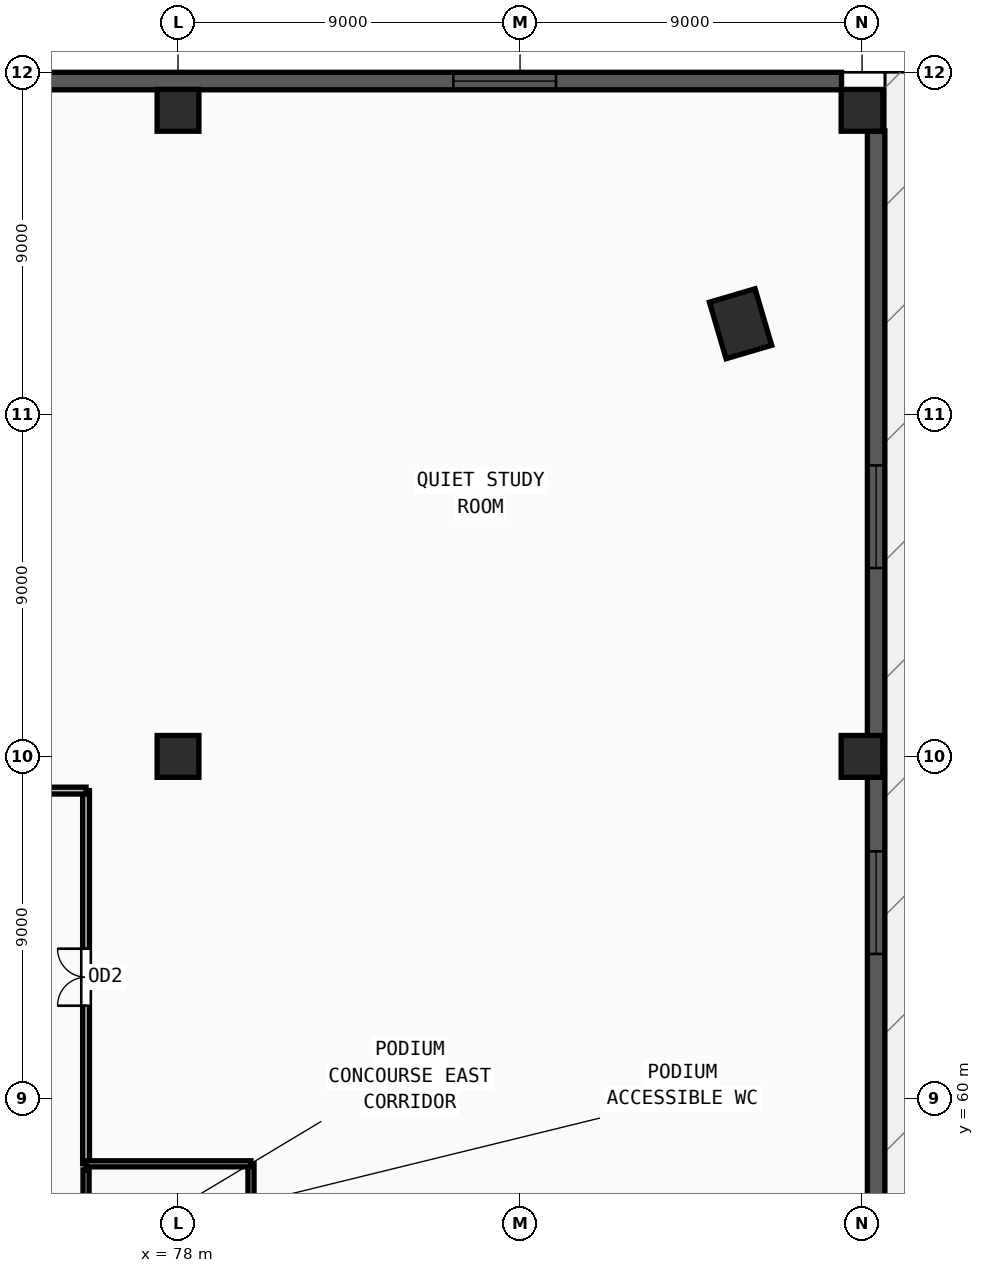
"""IFC4 building model, lengths in metres.
Left out: names, types, materials, properties, quantities, classifications, styles, units other than length and angle.
Written with IfcOpenShell. Run it as: python <this file> out.ifc"""

import sys

from ifc_helpers import new_model, si_unit, direction, frame, frame_2d, origin, origin_2d, place, context, subcontext, project, spatial, rectangle, extrude, source, transform, mapped, element, fill, save


model = new_model("IFC4")
c1 = context("Model", 3, precision=1e-05, world=origin(), true_north=direction((0.0, 1.0)))
c2 = subcontext(c1, "Body", "Model", "MODEL_VIEW")
j1 = project(units=[si_unit("LENGTHUNIT", "METRE"), si_unit("PLANEANGLEUNIT", "RADIAN")], contexts=[c1])
p1 = place(None, origin())
s1 = spatial("IfcSite", under=j1, at=p1, CompositionType="ELEMENT")
p2 = place(p1, origin())
s2 = spatial("IfcBuilding", under=s1, at=p2, CompositionType="ELEMENT")
p3 = place(p2, frame((0.0, 0.0, 18.9)))
s3 = spatial("IfcBuildingStorey", under=s2, at=p3, CompositionType="ELEMENT", Elevation=18.9)
m1 = source(origin(), c2, "Body", "SweptSolid", [
    extrude(rectangle(XDim=1.55, YDim=1.25, at=origin_2d()), origin(), (0.0, 0.0, 1.0), 4.5),
])
p4 = place(p3, frame((92.803, 80.384, 0.0), z_axis=(0.0, 0.0, 1.0), x_axis=(-0.282676303383, 0.959215360337, 0.0)))
e1 = element("IfcColumn", 1, at=p4, inside=s3, PredefinedType="COLUMN", context=c2, shape_type="MappedRepresentation", body=[
    mapped(m1, transform((0.0, 0.0, 0.0), x_axis=(1.0, 0.0, 0.0), y_axis=(0.0, 1.0, 0.0), z_axis=(0.0, 0.0, 1.0), scale=1.0)),
])
m2 = source(origin(), c2, "Body", "SweptSolid", [
    extrude(rectangle(XDim=1.1, YDim=1.1, at=origin_2d()), origin(), (0.0, 0.0, 1.0), 4.5),
])
for number, where, z_axis, x_axis in (
    (2, (78.0, 69.0, 0.0), (0.0, 0.0, 1.0), (1.0, 0.0, 0.0)),
    (3, (96.0, 69.0, 0.0), (0.0, 0.0, 1.0), (1.0, 0.0, 0.0)),
    (4, (78.0, 86.0, 0.0), (0.0, 0.0, 1.0), (1.0, 0.0, 0.0)),
    (5, (96.0, 86.0, 0.0), (0.0, 0.0, 1.0), (1.0, 0.0, 0.0)),
):
    element("IfcColumn", number, at=place(p3, frame(where, z_axis=z_axis, x_axis=x_axis)), inside=s3, PredefinedType="COLUMN", context=c2, shape_type="MappedRepresentation", body=[
        mapped(m2, transform((0.0, 0.0, 0.0), x_axis=(1.0, 0.0, 0.0), y_axis=(0.0, 1.0, 0.0), z_axis=(0.0, 0.0, 1.0), scale=1.0)),
    ])
p5 = place(p3, frame((96.37, 24.54, 0.0), z_axis=(0.0, 0.0, 1.0), x_axis=(0.0, 1.0, 0.0)))
e6 = element("IfcWall", 6, at=p5, inside=s3, PredefinedType="SOLIDWALL", context=c2, shape_type="SweptSolid", body=[
    extrude(rectangle(XDim=60.92, YDim=0.46, at=frame_2d((30.46, 0.0))), origin(), (0.0, 0.0, 1.0), 3.6),
])
m3 = source(origin(), c2, "Body", "SweptSolid", [
    extrude(rectangle(XDim=2.7, YDim=2.35, at=frame_2d((1.35, 1.175))), frame((0.0, 0.24, 0.0), z_axis=(0.0, -1.0, 0.0), x_axis=(1.0, 0.0, 0.0)), (0.0, 0.0, 1.0), 0.48),
])
p6 = place(p5, frame((8.803, 0.0, 0.55)))
e7 = element("IfcOpeningElement", 7, at=p6, cuts=e6, PredefinedType="OPENING", context=c2, shape_type="MappedRepresentation", body=[
    mapped(m3, transform((0.0, 0.0, 0.0), x_axis=(1.0, 0.0, 0.0), y_axis=(0.0, 1.0, 0.0), z_axis=(0.0, 0.0, 1.0), scale=1.0)),
])
p7 = place(p5, frame((29.11, 0.0, 0.55)))
e8 = element("IfcOpeningElement", 8, at=p7, cuts=e6, PredefinedType="OPENING", context=c2, shape_type="MappedRepresentation", body=[
    mapped(m3, transform((0.0, 0.0, 0.0), x_axis=(1.0, 0.0, 0.0), y_axis=(0.0, 1.0, 0.0), z_axis=(0.0, 0.0, 1.0), scale=1.0)),
])
p8 = place(p5, frame((39.263, 0.0, 0.55)))
e9 = element("IfcOpeningElement", 9, at=p8, cuts=e6, PredefinedType="OPENING", context=c2, shape_type="MappedRepresentation", body=[
    mapped(m3, transform((0.0, 0.0, 0.0), x_axis=(1.0, 0.0, 0.0), y_axis=(0.0, 1.0, 0.0), z_axis=(0.0, 0.0, 1.0), scale=1.0)),
])
p9 = place(p5, frame((49.417, 0.0, 0.55)))
e10 = element("IfcOpeningElement", 10, at=p9, cuts=e6, PredefinedType="OPENING", context=c2, shape_type="MappedRepresentation", body=[
    mapped(m3, transform((0.0, 0.0, 0.0), x_axis=(1.0, 0.0, 0.0), y_axis=(0.0, 1.0, 0.0), z_axis=(0.0, 0.0, 1.0), scale=1.0)),
])
p10 = place(p3, frame((95.46, 86.77, 0.0), z_axis=(0.0, 0.0, 1.0), x_axis=(-1.0, 0.0, 0.0)))
e11 = element("IfcWall", 11, at=p10, inside=s3, PredefinedType="SOLIDWALL", context=c2, shape_type="SweptSolid", body=[
    extrude(rectangle(XDim=70.92, YDim=0.46, at=frame_2d((35.46, 0.0))), origin(), (0.0, 0.0, 1.0), 3.6),
])
p11 = place(p10, frame((7.515, 0.0, 0.55)))
e12 = element("IfcOpeningElement", 12, at=p11, cuts=e11, PredefinedType="OPENING", context=c2, shape_type="MappedRepresentation", body=[
    mapped(m3, transform((0.0, 0.0, 0.0), x_axis=(1.0, 0.0, 0.0), y_axis=(0.0, 1.0, 0.0), z_axis=(0.0, 0.0, 1.0), scale=1.0)),
])
p12 = place(p10, frame((25.245, 0.0, 0.55)))
e13 = element("IfcOpeningElement", 13, at=p12, cuts=e11, PredefinedType="OPENING", context=c2, shape_type="MappedRepresentation", body=[
    mapped(m3, transform((0.0, 0.0, 0.0), x_axis=(1.0, 0.0, 0.0), y_axis=(0.0, 1.0, 0.0), z_axis=(0.0, 0.0, 1.0), scale=1.0)),
])
p13 = place(p10, frame((34.11, 0.0, 0.55)))
e14 = element("IfcOpeningElement", 14, at=p13, cuts=e11, PredefinedType="OPENING", context=c2, shape_type="MappedRepresentation", body=[
    mapped(m3, transform((0.0, 0.0, 0.0), x_axis=(1.0, 0.0, 0.0), y_axis=(0.0, 1.0, 0.0), z_axis=(0.0, 0.0, 1.0), scale=1.0)),
])
p14 = place(p10, frame((42.975, 0.0, 0.55)))
e15 = element("IfcOpeningElement", 15, at=p14, cuts=e11, PredefinedType="OPENING", context=c2, shape_type="MappedRepresentation", body=[
    mapped(m3, transform((0.0, 0.0, 0.0), x_axis=(1.0, 0.0, 0.0), y_axis=(0.0, 1.0, 0.0), z_axis=(0.0, 0.0, 1.0), scale=1.0)),
])
p15 = place(p10, frame((60.705, 0.0, 0.55)))
e16 = element("IfcOpeningElement", 16, at=p15, cuts=e11, PredefinedType="OPENING", context=c2, shape_type="MappedRepresentation", body=[
    mapped(m3, transform((0.0, 0.0, 0.0), x_axis=(1.0, 0.0, 0.0), y_axis=(0.0, 1.0, 0.0), z_axis=(0.0, 0.0, 1.0), scale=1.0)),
])
p16 = place(p3, frame((75.58, 55.28, 0.0), z_axis=(0.0, 0.0, 1.0), x_axis=(0.0, 1.0, 0.0)))
e17 = element("IfcWall", 17, at=p16, inside=s3, PredefinedType="PARTITIONING", context=c2, shape_type="SweptSolid", body=[
    extrude(rectangle(XDim=2.84, YDim=0.16, at=frame_2d((1.42, 0.0))), origin(), (0.0, 0.0, 1.0), 3.6),
])
m4 = source(origin(), c2, "Body", "SweptSolid", [
    extrude(rectangle(XDim=1.05, YDim=2.15, at=frame_2d((0.525, 1.075))), frame((0.0, 0.09, 0.0), z_axis=(0.0, -1.0, 0.0), x_axis=(1.0, 0.0, 0.0)), (0.0, 0.0, 1.0), 0.18),
])
p17 = place(p16, frame((0.895, 0.0, 0.0)))
e18 = element("IfcOpeningElement", 18, at=p17, cuts=e17, PredefinedType="OPENING", context=c2, shape_type="MappedRepresentation", body=[
    mapped(m4, transform((0.0, 0.0, 0.0), x_axis=(1.0, 0.0, 0.0), y_axis=(0.0, 1.0, 0.0), z_axis=(0.0, 0.0, 1.0), scale=1.0)),
])
p18 = place(p3, frame((75.58, 58.28, 0.0), z_axis=(0.0, 0.0, 1.0), x_axis=(0.0, 1.0, 0.0)))
e19 = element("IfcWall", 19, at=p18, inside=s3, PredefinedType="PARTITIONING", context=c2, shape_type="SweptSolid", body=[
    extrude(rectangle(XDim=9.82, YDim=0.18, at=frame_2d((4.91, 0.0))), origin(), (0.0, 0.0, 1.0), 3.6),
])
m5 = source(origin(), c2, "Body", "SweptSolid", [
    extrude(rectangle(XDim=1.5, YDim=2.2, at=frame_2d((0.75, 1.1))), frame((0.0, 0.1, 0.0), z_axis=(0.0, -1.0, 0.0), x_axis=(1.0, 0.0, 0.0)), (0.0, 0.0, 1.0), 0.2),
])
p19 = place(p18, frame((4.16, 0.0, 0.0)))
e20 = element("IfcOpeningElement", 20, at=p19, cuts=e19, PredefinedType="OPENING", context=c2, shape_type="MappedRepresentation", body=[
    mapped(m5, transform((0.0, 0.0, 0.0), x_axis=(1.0, 0.0, 0.0), y_axis=(0.0, 1.0, 0.0), z_axis=(0.0, 0.0, 1.0), scale=1.0)),
])
p20 = place(p3, frame((79.92, 47.92, 0.0), z_axis=(0.0, 0.0, 1.0), x_axis=(0.0, 1.0, 0.0)))
e21 = element("IfcWall", 21, at=p20, inside=s3, PredefinedType="PARTITIONING", context=c2, shape_type="SweptSolid", body=[
    extrude(rectangle(XDim=10.36, YDim=0.16, at=frame_2d((5.18, 0.0))), origin(), (0.0, 0.0, 1.0), 3.6),
])
p21 = place(p3, frame((75.58, 58.28, 0.0), z_axis=(0.0, 0.0, 1.0), x_axis=(1.0, 0.0, 0.0)))
e22 = element("IfcWall", 22, at=p21, inside=s3, PredefinedType="PARTITIONING", context=c2, shape_type="SweptSolid", body=[
    extrude(rectangle(XDim=4.34, YDim=0.16, at=frame_2d((2.17, 0.0))), origin(), (0.0, 0.0, 1.0), 3.6),
])
p22 = place(p3, frame((71.7, 68.1, 0.0), z_axis=(0.0, 0.0, 1.0), x_axis=(1.0, 0.0, 0.0)))
e23 = element("IfcWall", 23, at=p22, inside=s3, PredefinedType="PARTITIONING", context=c2, shape_type="SweptSolid", body=[
    extrude(rectangle(XDim=3.88, YDim=0.18, at=frame_2d((1.94, 0.0))), origin(), (0.0, 0.0, 1.0), 3.6),
])
m6 = source(origin(), c2, "Body", "SweptSolid", [
    extrude(rectangle(XDim=2.7, YDim=2.35, at=frame_2d((1.35, 1.175))), frame((0.0, 0.03, 0.0), z_axis=(0.0, -1.0, 0.0), x_axis=(1.0, 0.0, 0.0)), (0.0, 0.0, 1.0), 0.06),
])
p23 = place(p8, origin())
e24 = element("IfcWindow", 24, at=p23, inside=s3, PartitioningType="TRIPLE_PANEL_VERTICAL", PredefinedType="WINDOW", context=c2, shape_type="MappedRepresentation", body=[
    mapped(m6, transform((0.0, 0.0, 0.0), x_axis=(1.0, 0.0, 0.0), y_axis=(0.0, 1.0, 0.0), z_axis=(0.0, 0.0, 1.0), scale=1.0)),
])
fill(e9, e24)
p24 = place(p9, origin())
e25 = element("IfcWindow", 25, at=p24, inside=s3, PartitioningType="TRIPLE_PANEL_VERTICAL", PredefinedType="WINDOW", context=c2, shape_type="MappedRepresentation", body=[
    mapped(m6, transform((0.0, 0.0, 0.0), x_axis=(1.0, 0.0, 0.0), y_axis=(0.0, 1.0, 0.0), z_axis=(0.0, 0.0, 1.0), scale=1.0)),
])
fill(e10, e25)
p25 = place(p11, origin())
e26 = element("IfcWindow", 26, at=p25, inside=s3, PartitioningType="TRIPLE_PANEL_VERTICAL", PredefinedType="WINDOW", context=c2, shape_type="MappedRepresentation", body=[
    mapped(m6, transform((0.0, 0.0, 0.0), x_axis=(1.0, 0.0, 0.0), y_axis=(0.0, 1.0, 0.0), z_axis=(0.0, 0.0, 1.0), scale=1.0)),
])
fill(e12, e26)
m7 = source(origin(), c2, "Body", "SweptSolid", [
    extrude(rectangle(XDim=1.5, YDim=2.2, at=frame_2d((0.75, 1.1))), frame((0.0, 0.025, 0.0), z_axis=(0.0, -1.0, 0.0), x_axis=(1.0, 0.0, 0.0)), (0.0, 0.0, 1.0), 0.05),
])
p26 = place(p19, origin())
e27 = element("IfcDoor", 27, at=p26, inside=s3, OperationType="DOUBLE_DOOR_SINGLE_SWING", PredefinedType="DOOR", context=c2, shape_type="MappedRepresentation", body=[
    mapped(m7, transform((0.0, 0.0, 0.0), x_axis=(1.0, 0.0, 0.0), y_axis=(0.0, 1.0, 0.0), z_axis=(0.0, 0.0, 1.0), scale=1.0)),
])
fill(e20, e27)
save(model, sys.argv[1])
